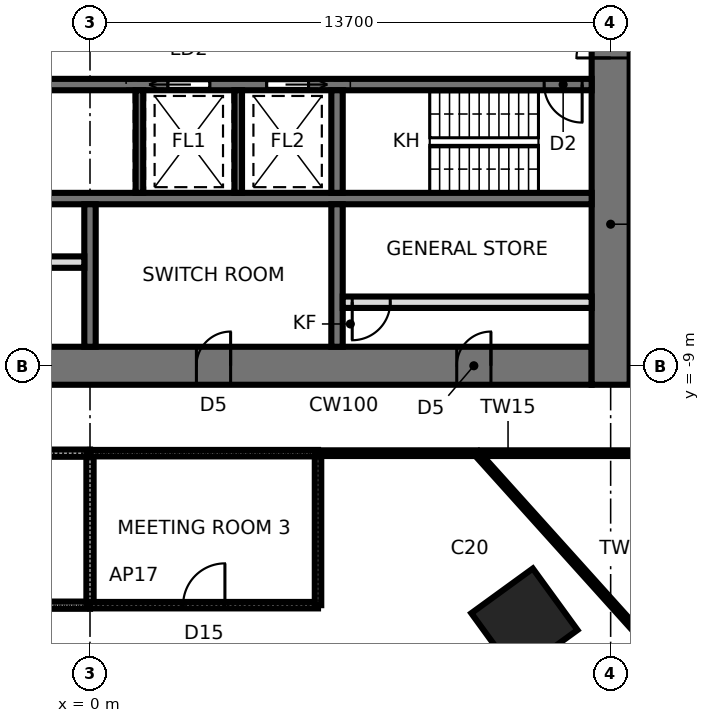
"""IFC4 building model, lengths in metres.
Left out: names, types, materials, properties, quantities, classifications, styles, units other than length and angle.
Written with IfcOpenShell. Run it as: python <this file> out.ifc"""

import sys

from ifc_helpers import new_model, si_unit, direction, frame, frame_2d, origin, origin_2d, place, context, subcontext, project, spatial, rectangle, extrude, element, fill, save


model = new_model("IFC4")
c1 = context("Model", 3, precision=1e-05, world=origin(), true_north=direction((0.0, 1.0)))
c2 = subcontext(c1, "Body", "Model", "MODEL_VIEW")
j1 = project(units=[si_unit("LENGTHUNIT", "METRE"), si_unit("PLANEANGLEUNIT", "RADIAN")], contexts=[c1])
p1 = place(None, origin())
s1 = spatial("IfcSite", under=j1, at=p1, CompositionType="ELEMENT")
p2 = place(p1, origin())
s2 = spatial("IfcBuilding", under=s1, at=p2, CompositionType="ELEMENT")
p3 = place(p2, frame((0.0, 0.0, 44.8)))
s3 = spatial("IfcBuildingStorey", under=s2, at=p3, CompositionType="ELEMENT", Elevation=44.8)
p4 = place(p3, frame((11.43, -15.733, 0.0), z_axis=(0.0, 0.0, 1.0), x_axis=(0.587785252292, -0.809016994375, 0.0)))
e1 = element("IfcColumn", 1, at=p4, inside=s3, PredefinedType="COLUMN", context=c2, shape_type="SweptSolid", body=[
    extrude(rectangle(XDim=2.0, YDim=2.0, at=origin_2d()), origin(), (0.0, 0.0, 1.0), 4.2),
])
p5 = place(p3, frame((-13.2, -9.0, 0.0), z_axis=(0.0, 0.0, 1.0), x_axis=(1.0, 0.0, 0.0)))
e2 = element("IfcWall", 2, at=p5, inside=s3, PredefinedType="SHEAR", context=c2, shape_type="SweptSolid", body=[
    extrude(rectangle(XDim=26.4, YDim=1.0, at=frame_2d((13.2, 0.0))), origin(), (0.0, 0.0, 1.0), 4.2),
])
p6 = place(p5, frame((2.65, 0.0, 0.0)))
e3 = element("IfcOpeningElement", 3, at=p6, cuts=e2, PredefinedType="OPENING", context=c2, shape_type="SweptSolid", body=[
    extrude(rectangle(XDim=0.9, YDim=2.1, at=frame_2d((0.45, 1.05))), frame((0.0, 0.51, 0.0), z_axis=(0.0, -1.0, 0.0), x_axis=(1.0, 0.0, 0.0)), (0.0, 0.0, 1.0), 1.02),
])
p7 = place(p5, frame((9.5, 0.0, 0.0)))
e4 = element("IfcOpeningElement", 4, at=p7, cuts=e2, PredefinedType="OPENING", context=c2, shape_type="SweptSolid", body=[
    extrude(rectangle(XDim=0.9, YDim=2.1, at=frame_2d((0.45, 1.05))), frame((0.0, 0.51, 0.0), z_axis=(0.0, -1.0, 0.0), x_axis=(1.0, 0.0, 0.0)), (0.0, 0.0, 1.0), 1.02),
])
p8 = place(p5, frame((16.0, 0.0, 0.0)))
e5 = element("IfcOpeningElement", 5, at=p8, cuts=e2, PredefinedType="OPENING", context=c2, shape_type="SweptSolid", body=[
    extrude(rectangle(XDim=0.9, YDim=2.1, at=frame_2d((0.45, 1.05))), frame((0.0, 0.51, 0.0), z_axis=(0.0, -1.0, 0.0), x_axis=(1.0, 0.0, 0.0)), (0.0, 0.0, 1.0), 1.02),
])
p9 = place(p5, frame((22.85, 0.0, 0.0)))
e6 = element("IfcOpeningElement", 6, at=p9, cuts=e2, PredefinedType="OPENING", context=c2, shape_type="SweptSolid", body=[
    extrude(rectangle(XDim=0.9, YDim=2.1, at=frame_2d((0.45, 1.05))), frame((0.0, 0.51, 0.0), z_axis=(0.0, -1.0, 0.0), x_axis=(1.0, 0.0, 0.0)), (0.0, 0.0, 1.0), 1.02),
])
p10 = place(p3, frame((13.7, -9.5, 0.0), z_axis=(0.0, 0.0, 1.0), x_axis=(0.0, 1.0, 0.0)))
e7 = element("IfcWall", 7, at=p10, inside=s3, PredefinedType="SHEAR", context=c2, shape_type="SweptSolid", body=[
    extrude(rectangle(XDim=19.0, YDim=1.0, at=frame_2d((9.5, 0.0))), origin(), (0.0, 0.0, 1.0), 4.2),
])
p11 = place(p10, frame((8.6, 0.0, 0.0)))
e8 = element("IfcOpeningElement", 8, at=p11, cuts=e7, PredefinedType="OPENING", context=c2, shape_type="SweptSolid", body=[
    extrude(rectangle(XDim=1.8, YDim=2.4, at=frame_2d((0.9, 1.2))), frame((0.0, 0.51, 0.0), z_axis=(0.0, -1.0, 0.0), x_axis=(1.0, 0.0, 0.0)), (0.0, 0.0, 1.0), 1.02),
])
p12 = place(p3, frame((-13.2, -1.6, 0.0), z_axis=(0.0, 0.0, 1.0), x_axis=(1.0, 0.0, 0.0)))
e9 = element("IfcWall", 9, at=p12, inside=s3, PredefinedType="SHEAR", context=c2, shape_type="SweptSolid", body=[
    extrude(rectangle(XDim=26.4, YDim=0.3, at=frame_2d((13.2, 0.0))), origin(), (0.0, 0.0, 1.0), 4.2),
])
p13 = place(p12, frame((25.15, 0.0, 0.0)))
e10 = element("IfcOpeningElement", 10, at=p13, cuts=e9, PredefinedType="OPENING", context=c2, shape_type="SweptSolid", body=[
    extrude(rectangle(XDim=1.0, YDim=2.1, at=frame_2d((0.5, 1.05))), frame((0.0, 0.16, 0.0), z_axis=(0.0, -1.0, 0.0), x_axis=(1.0, 0.0, 0.0)), (0.0, 0.0, 1.0), 0.32),
])
p14 = place(p12, frame((15.25, 0.0, 0.0)))
e11 = element("IfcOpeningElement", 11, at=p14, cuts=e9, PredefinedType="OPENING", context=c2, shape_type="SweptSolid", body=[
    extrude(rectangle(XDim=1.1, YDim=2.3, at=frame_2d((0.55, 1.15))), frame((0.0, 0.16, 0.0), z_axis=(0.0, -1.0, 0.0), x_axis=(1.0, 0.0, 0.0)), (0.0, 0.0, 1.0), 0.32),
])
p15 = place(p12, frame((17.85, 0.0, 0.0)))
e12 = element("IfcOpeningElement", 12, at=p15, cuts=e9, PredefinedType="OPENING", context=c2, shape_type="SweptSolid", body=[
    extrude(rectangle(XDim=1.1, YDim=2.3, at=frame_2d((0.55, 1.15))), frame((0.0, 0.16, 0.0), z_axis=(0.0, -1.0, 0.0), x_axis=(1.0, 0.0, 0.0)), (0.0, 0.0, 1.0), 0.32),
])
p16 = place(p12, frame((5.55, 0.0, 0.0)))
e13 = element("IfcOpeningElement", 13, at=p16, cuts=e9, PredefinedType="OPENING", context=c2, shape_type="SweptSolid", body=[
    extrude(rectangle(XDim=0.9, YDim=2.1, at=frame_2d((0.45, 1.05))), frame((0.0, 0.16, 0.0), z_axis=(0.0, -1.0, 0.0), x_axis=(1.0, 0.0, 0.0)), (0.0, 0.0, 1.0), 0.32),
])
p17 = place(p3, frame((-13.2, -4.6, 0.0), z_axis=(0.0, 0.0, 1.0), x_axis=(1.0, 0.0, 0.0)))
e14 = element("IfcWall", 14, at=p17, inside=s3, PredefinedType="SHEAR", context=c2, shape_type="SweptSolid", body=[
    extrude(rectangle(XDim=26.4, YDim=0.3, at=frame_2d((13.2, 0.0))), origin(), (0.0, 0.0, 1.0), 4.2),
])
p18 = place(p3, frame((6.5, -1.75, 0.0), z_axis=(0.0, 0.0, 1.0), x_axis=(0.0, -1.0, 0.0)))
e15 = element("IfcWall", 15, at=p18, inside=s3, PredefinedType="SHEAR", context=c2, shape_type="SweptSolid", body=[
    extrude(rectangle(XDim=2.7, YDim=0.3, at=frame_2d((1.35, 0.0))), origin(), (0.0, 0.0, 1.0), 4.2),
])
p19 = place(p3, frame((6.5, -4.75, 0.0), z_axis=(0.0, 0.0, 1.0), x_axis=(0.0, -1.0, 0.0)))
e16 = element("IfcWall", 16, at=p19, inside=s3, PredefinedType="SHEAR", context=c2, shape_type="SweptSolid", body=[
    extrude(rectangle(XDim=3.75, YDim=0.3, at=frame_2d((1.875, 0.0))), origin(), (0.0, 0.0, 1.0), 4.2),
])
for number, where, z_axis, x_axis in (
    (17, (1.3, -1.75, 0.0), (0.0, 0.0, 1.0), (0.0, -1.0, 0.0)),
    (18, (3.9, -1.75, 0.0), (0.0, 0.0, 1.0), (0.0, -1.0, 0.0)),
):
    element("IfcWall", number, at=place(p3, frame(where, z_axis=z_axis, x_axis=x_axis)), inside=s3, PredefinedType="SHEAR", context=c2, shape_type="SweptSolid", body=[
        extrude(rectangle(XDim=2.7, YDim=0.2, at=frame_2d((1.35, 0.0))), origin(), (0.0, 0.0, 1.0), 4.2),
    ])
p20 = place(p3, frame((0.0, -4.75, 0.0), z_axis=(0.0, 0.0, 1.0), x_axis=(0.0, -1.0, 0.0)))
e19 = element("IfcWall", 19, at=p20, inside=s3, PredefinedType="SHEAR", context=c2, shape_type="SweptSolid", body=[
    extrude(rectangle(XDim=3.75, YDim=0.3, at=frame_2d((1.875, 0.0))), origin(), (0.0, 0.0, 1.0), 4.2),
])
p21 = place(p3, frame((-6.35, -6.272, 0.0), z_axis=(0.0, 0.0, 1.0), x_axis=(1.0, 0.0, 0.0)))
e20 = element("IfcWall", 20, at=p21, inside=s3, PredefinedType="PARTITIONING", context=c2, shape_type="SweptSolid", body=[
    extrude(rectangle(XDim=6.2, YDim=0.3, at=frame_2d((3.1, 0.0))), origin(), (0.0, 0.0, 1.0), 4.04),
])
p22 = place(p21, frame((0.25, 0.0, 0.0)))
e21 = element("IfcOpeningElement", 21, at=p22, cuts=e20, PredefinedType="OPENING", context=c2, shape_type="SweptSolid", body=[
    extrude(rectangle(XDim=1.0, YDim=2.4, at=frame_2d((0.5, 1.2))), frame((0.0, 0.16, 0.0), z_axis=(0.0, -1.0, 0.0), x_axis=(1.0, 0.0, 0.0)), (0.0, 0.0, 1.0), 0.32),
])
p23 = place(p3, frame((6.65, -7.328, 0.0), z_axis=(0.0, 0.0, 1.0), x_axis=(1.0, 0.0, 0.0)))
e22 = element("IfcWall", 22, at=p23, inside=s3, PredefinedType="PARTITIONING", context=c2, shape_type="SweptSolid", body=[
    extrude(rectangle(XDim=6.55, YDim=0.3, at=frame_2d((3.275, 0.0))), origin(), (0.0, 0.0, 1.0), 4.04),
])
p24 = place(p23, frame((0.25, 0.0, 0.0)))
e23 = element("IfcOpeningElement", 23, at=p24, cuts=e22, PredefinedType="OPENING", context=c2, shape_type="SweptSolid", body=[
    extrude(rectangle(XDim=1.0, YDim=2.4, at=frame_2d((0.5, 1.2))), frame((0.0, 0.16, 0.0), z_axis=(0.0, -1.0, 0.0), x_axis=(1.0, 0.0, 0.0)), (0.0, 0.0, 1.0), 0.32),
])
p25 = place(p3, frame((0.0, -11.3, 0.0), z_axis=(0.0, 0.0, 1.0), x_axis=(-1.0, 0.0, 0.0)))
e24 = element("IfcWall", 24, at=p25, inside=s3, PredefinedType="SOLIDWALL", context=c2, shape_type="SweptSolid", body=[
    extrude(rectangle(XDim=6.0, YDim=0.19, at=frame_2d((3.0, 0.0))), origin(), (0.0, 0.0, 1.0), 4.04),
])
p26 = place(p3, frame((-6.0, -15.3, 0.0), z_axis=(0.0, 0.0, 1.0), x_axis=(1.0, 0.0, 0.0)))
e25 = element("IfcWall", 25, at=p26, inside=s3, PredefinedType="SOLIDWALL", context=c2, shape_type="SweptSolid", body=[
    extrude(rectangle(XDim=6.0, YDim=0.19, at=frame_2d((3.0, 0.0))), origin(), (0.0, 0.0, 1.0), 3.586),
])
p27 = place(p26, frame((2.4, 0.0, 0.0)))
e26 = element("IfcOpeningElement", 26, at=p27, cuts=e25, PredefinedType="OPENING", context=c2, shape_type="SweptSolid", body=[
    extrude(rectangle(XDim=1.2, YDim=2.1, at=frame_2d((0.6, 1.05))), frame((0.0, 0.105, 0.0), z_axis=(0.0, -1.0, 0.0), x_axis=(1.0, 0.0, 0.0)), (0.0, 0.0, 1.0), 0.21),
])
p28 = place(p3, frame((0.0, -11.3, 0.0), z_axis=(0.0, 0.0, 1.0), x_axis=(0.0, -1.0, 0.0)))
e27 = element("IfcWall", 27, at=p28, inside=s3, PredefinedType="SOLIDWALL", context=c2, shape_type="SweptSolid", body=[
    extrude(rectangle(XDim=4.0, YDim=0.19, at=frame_2d((2.0, 0.0))), origin(), (0.0, 0.0, 1.0), 2.84),
])
p29 = place(p3, frame((0.0, -15.3, 0.0), z_axis=(0.0, 0.0, 1.0), x_axis=(1.0, 0.0, 0.0)))
e28 = element("IfcWall", 28, at=p29, inside=s3, PredefinedType="PARTITIONING", context=c2, shape_type="SweptSolid", body=[
    extrude(rectangle(XDim=6.0, YDim=0.17, at=frame_2d((3.0, 0.0))), origin(), (0.0, 0.0, 1.0), 3.586),
])
p30 = place(p29, frame((2.45, 0.0, 0.0)))
e29 = element("IfcOpeningElement", 29, at=p30, cuts=e28, PredefinedType="OPENING", context=c2, shape_type="SweptSolid", body=[
    extrude(rectangle(XDim=1.1, YDim=2.4, at=frame_2d((0.55, 1.2))), frame((0.0, 0.095, 0.0), z_axis=(0.0, -1.0, 0.0), x_axis=(1.0, 0.0, 0.0)), (0.0, 0.0, 1.0), 0.19),
])
p31 = place(p3, frame((6.0, -11.3, 0.0), z_axis=(0.0, 0.0, 1.0), x_axis=(-1.0, 0.0, 0.0)))
e30 = element("IfcWall", 30, at=p31, inside=s3, PredefinedType="PARTITIONING", context=c2, shape_type="SweptSolid", body=[
    extrude(rectangle(XDim=6.0, YDim=0.17, at=frame_2d((3.0, 0.0))), origin(), (0.0, 0.0, 1.0), 4.04),
])
p32 = place(p3, frame((6.0, -15.3, 0.0), z_axis=(0.0, 0.0, 1.0), x_axis=(0.0, 1.0, 0.0)))
e31 = element("IfcWall", 31, at=p32, inside=s3, PredefinedType="PARTITIONING", context=c2, shape_type="SweptSolid", body=[
    extrude(rectangle(XDim=4.0, YDim=0.17, at=frame_2d((2.0, 0.0))), origin(), (0.0, 0.0, 1.0), 4.04),
])
p33 = place(p3, frame((16.214, -18.008, 0.0), z_axis=(0.0, 0.0, 1.0), x_axis=(-0.669136564673, 0.743139460544, 0.0)))
e32 = element("IfcWall", 32, at=p33, inside=s3, PredefinedType="PARTITIONING", context=c2, shape_type="SweptSolid", body=[
    extrude(rectangle(XDim=9.026, YDim=0.15, at=frame_2d((4.513, 0.0))), origin(), (0.0, 0.0, 1.0), 4.04),
])
p34 = place(p3, frame((6.0, -11.3, 0.0), z_axis=(0.0, 0.0, 1.0), x_axis=(1.0, 0.0, 0.0)))
e33 = element("IfcWall", 33, at=p34, inside=s3, PredefinedType="PARTITIONING", context=c2, shape_type="SweptSolid", body=[
    extrude(rectangle(XDim=10.0, YDim=0.15, at=frame_2d((5.0, 0.0))), origin(), (0.0, 0.0, 1.0), 4.04),
])
p35 = place(p11, origin())
e34 = element("IfcDoor", 34, at=p35, inside=s3, OperationType="DOUBLE_DOOR_SINGLE_SWING", PredefinedType="DOOR", context=c2, shape_type="SweptSolid", body=[
    extrude(rectangle(XDim=1.72, YDim=2.36, at=frame_2d((0.9, 1.18))), frame((0.0, 0.025, 0.0), z_axis=(0.0, -1.0, 0.0), x_axis=(1.0, 0.0, 0.0)), (0.0, 0.0, 1.0), 0.05),
    extrude(rectangle(XDim=0.04, YDim=2.4, at=frame_2d((0.02, 1.2))), frame((0.0, 0.25, 0.0), z_axis=(0.0, -1.0, 0.0), x_axis=(1.0, 0.0, 0.0)), (0.0, 0.0, 1.0), 0.5),
    extrude(rectangle(XDim=0.04, YDim=2.4, at=frame_2d((1.78, 1.2))), frame((0.0, 0.25, 0.0), z_axis=(0.0, -1.0, 0.0), x_axis=(1.0, 0.0, 0.0)), (0.0, 0.0, 1.0), 0.5),
    extrude(rectangle(XDim=1.72, YDim=0.04, at=frame_2d((0.9, 2.38))), frame((0.0, 0.25, 0.0), z_axis=(0.0, -1.0, 0.0), x_axis=(1.0, 0.0, 0.0)), (0.0, 0.0, 1.0), 0.5),
])
fill(e8, e34)
p36 = place(p13, frame((1.0, 0.0, 0.0), z_axis=(0.0, 0.0, 1.0), x_axis=(-1.0, 0.0, 0.0)))
e35 = element("IfcDoor", 35, at=p36, inside=s3, OperationType="SINGLE_SWING_LEFT", PredefinedType="DOOR", context=c2, shape_type="SweptSolid", body=[
    extrude(rectangle(XDim=1.0, YDim=2.1, at=frame_2d((0.5, 1.05))), frame((0.0, 0.025, 0.0), z_axis=(0.0, -1.0, 0.0), x_axis=(1.0, 0.0, 0.0)), (0.0, 0.0, 1.0), 0.05),
])
fill(e10, e35)
p37 = place(p14, frame((1.1, 0.0, 0.0), z_axis=(0.0, 0.0, 1.0), x_axis=(-1.0, 0.0, 0.0)))
e36 = element("IfcDoor", 36, at=p37, inside=s3, OperationType="SLIDING_TO_RIGHT", PredefinedType="DOOR", context=c2, shape_type="SweptSolid", body=[
    extrude(rectangle(XDim=1.1, YDim=2.3, at=frame_2d((0.55, 1.15))), frame((0.0, 0.025, 0.0), z_axis=(0.0, -1.0, 0.0), x_axis=(1.0, 0.0, 0.0)), (0.0, 0.0, 1.0), 0.05),
])
fill(e11, e36)
p38 = place(p15, frame((1.1, 0.0, 0.0), z_axis=(0.0, 0.0, 1.0), x_axis=(-1.0, 0.0, 0.0)))
e37 = element("IfcDoor", 37, at=p38, inside=s3, OperationType="SLIDING_TO_LEFT", PredefinedType="DOOR", context=c2, shape_type="SweptSolid", body=[
    extrude(rectangle(XDim=1.1, YDim=2.3, at=frame_2d((0.55, 1.15))), frame((0.0, 0.025, 0.0), z_axis=(0.0, -1.0, 0.0), x_axis=(1.0, 0.0, 0.0)), (0.0, 0.0, 1.0), 0.05),
])
fill(e12, e37)
p39 = place(p8, origin())
e38 = element("IfcDoor", 38, at=p39, inside=s3, OperationType="SINGLE_SWING_RIGHT", PredefinedType="DOOR", context=c2, shape_type="SweptSolid", body=[
    extrude(rectangle(XDim=0.82, YDim=2.06, at=frame_2d((0.45, 1.03))), frame((0.0, 0.025, 0.0), z_axis=(0.0, -1.0, 0.0), x_axis=(1.0, 0.0, 0.0)), (0.0, 0.0, 1.0), 0.05),
    extrude(rectangle(XDim=0.04, YDim=2.1, at=frame_2d((0.02, 1.05))), frame((0.0, 0.25, 0.0), z_axis=(0.0, -1.0, 0.0), x_axis=(1.0, 0.0, 0.0)), (0.0, 0.0, 1.0), 0.5),
    extrude(rectangle(XDim=0.04, YDim=2.1, at=frame_2d((0.88, 1.05))), frame((0.0, 0.25, 0.0), z_axis=(0.0, -1.0, 0.0), x_axis=(1.0, 0.0, 0.0)), (0.0, 0.0, 1.0), 0.5),
    extrude(rectangle(XDim=0.82, YDim=0.04, at=frame_2d((0.45, 2.08))), frame((0.0, 0.25, 0.0), z_axis=(0.0, -1.0, 0.0), x_axis=(1.0, 0.0, 0.0)), (0.0, 0.0, 1.0), 0.5),
])
fill(e5, e38)
p40 = place(p9, origin())
e39 = element("IfcDoor", 39, at=p40, inside=s3, OperationType="SINGLE_SWING_RIGHT", PredefinedType="DOOR", context=c2, shape_type="SweptSolid", body=[
    extrude(rectangle(XDim=0.82, YDim=2.06, at=frame_2d((0.45, 1.03))), frame((0.0, 0.025, 0.0), z_axis=(0.0, -1.0, 0.0), x_axis=(1.0, 0.0, 0.0)), (0.0, 0.0, 1.0), 0.05),
    extrude(rectangle(XDim=0.04, YDim=2.1, at=frame_2d((0.02, 1.05))), frame((0.0, 0.25, 0.0), z_axis=(0.0, -1.0, 0.0), x_axis=(1.0, 0.0, 0.0)), (0.0, 0.0, 1.0), 0.5),
    extrude(rectangle(XDim=0.04, YDim=2.1, at=frame_2d((0.88, 1.05))), frame((0.0, 0.25, 0.0), z_axis=(0.0, -1.0, 0.0), x_axis=(1.0, 0.0, 0.0)), (0.0, 0.0, 1.0), 0.5),
    extrude(rectangle(XDim=0.82, YDim=0.04, at=frame_2d((0.45, 2.08))), frame((0.0, 0.25, 0.0), z_axis=(0.0, -1.0, 0.0), x_axis=(1.0, 0.0, 0.0)), (0.0, 0.0, 1.0), 0.5),
])
fill(e6, e39)
p41 = place(p24, frame((1.0, 0.0, 0.0), z_axis=(0.0, 0.0, 1.0), x_axis=(-1.0, 0.0, 0.0)))
e40 = element("IfcDoor", 40, at=p41, inside=s3, OperationType="SINGLE_SWING_RIGHT", PredefinedType="DOOR", context=c2, shape_type="SweptSolid", body=[
    extrude(rectangle(XDim=1.0, YDim=2.4, at=frame_2d((0.5, 1.2))), frame((0.0, 0.025, 0.0), z_axis=(0.0, -1.0, 0.0), x_axis=(1.0, 0.0, 0.0)), (0.0, 0.0, 1.0), 0.05),
])
fill(e23, e40)
p42 = place(p30, origin())
e41 = element("IfcDoor", 41, at=p42, inside=s3, OperationType="SINGLE_SWING_RIGHT", PredefinedType="DOOR", context=c2, shape_type="SweptSolid", body=[
    extrude(rectangle(XDim=1.1, YDim=2.4, at=frame_2d((0.55, 1.2))), frame((0.0, 0.025, 0.0), z_axis=(0.0, -1.0, 0.0), x_axis=(1.0, 0.0, 0.0)), (0.0, 0.0, 1.0), 0.05),
])
fill(e29, e41)
save(model, sys.argv[1])
